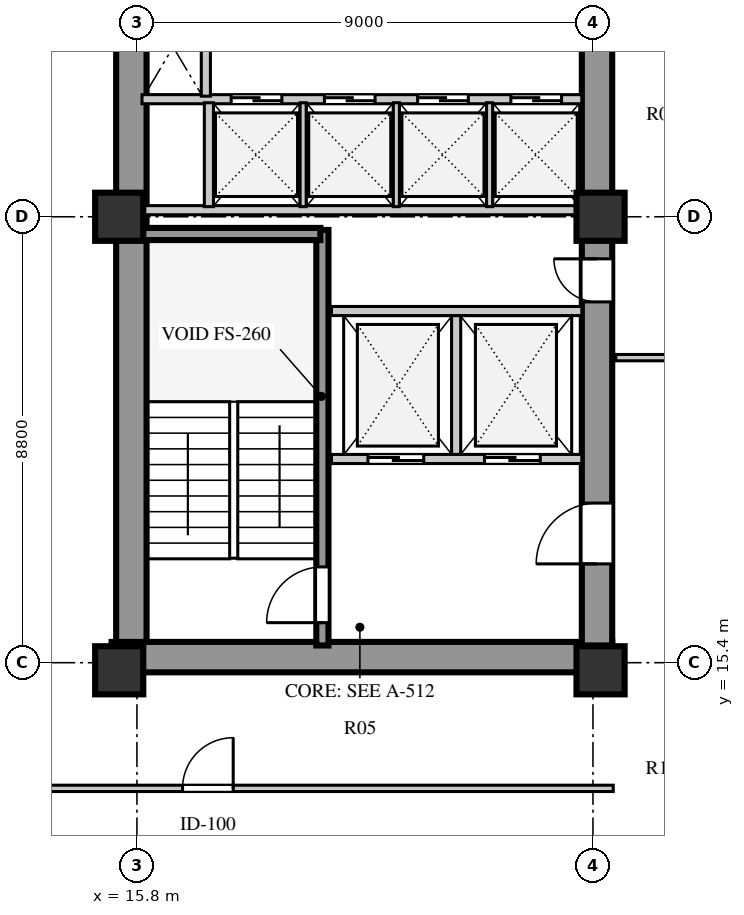
"""IFC4 building model, lengths in metres.
Left out: names, types, materials, properties, quantities, classifications, styles, units other than length and angle.
Written with IfcOpenShell. Run it as: python <this file> out.ifc"""

import sys

from ifc_helpers import new_model, si_unit, direction, frame, frame_2d, origin, origin_2d, place, context, subcontext, project, spatial, rectangle, extrude, element, fill, save


model = new_model("IFC4")
c1 = context("Model", 3, precision=1e-05, world=origin(), true_north=direction((0.0, 1.0)))
c2 = subcontext(c1, "Body", "Model", "MODEL_VIEW")
j1 = project(units=[si_unit("LENGTHUNIT", "METRE"), si_unit("PLANEANGLEUNIT", "RADIAN")], contexts=[c1])
p1 = place(None, origin())
s1 = spatial("IfcSite", under=j1, at=p1, CompositionType="ELEMENT")
p2 = place(p1, origin())
s2 = spatial("IfcBuilding", under=s1, at=p2, CompositionType="ELEMENT")
p3 = place(p2, frame((0.0, 0.0, 90.0)))
s3 = spatial("IfcBuildingStorey", under=s2, at=p3, CompositionType="ELEMENT", Elevation=90.0)
p4 = place(p3, frame((15.3, 15.51, 0.0), z_axis=(0.0, 0.0, 1.0), x_axis=(1.0, 0.0, 0.0)))
e1 = element("IfcWall", 1, at=p4, inside=s3, PredefinedType="SHEAR", context=c2, shape_type="SweptSolid", body=[
    extrude(rectangle(XDim=9.88, YDim=0.6, at=frame_2d((4.94, 0.0))), origin(), (0.0, 0.0, 1.0), 3.7),
])
p5 = place(p3, frame((15.69, 15.81, 0.0), z_axis=(0.0, 0.0, 1.0), x_axis=(0.0, 1.0, 0.0)))
e2 = element("IfcWall", 2, at=p5, inside=s3, PredefinedType="SHEAR", context=c2, shape_type="SweptSolid", body=[
    extrude(rectangle(XDim=25.63, YDim=0.6, at=frame_2d((12.815, 0.0))), origin(), (0.0, 0.0, 1.0), 3.7),
])
p6 = place(p3, frame((24.88, 15.74, 0.0), z_axis=(0.0, 0.0, 1.0), x_axis=(0.0, 1.0, 0.0)))
e3 = element("IfcWall", 3, at=p6, inside=s3, PredefinedType="SHEAR", context=c2, shape_type="SweptSolid", body=[
    extrude(rectangle(XDim=25.76, YDim=0.6, at=frame_2d((12.88, 0.0))), origin(), (0.0, 0.0, 1.0), 3.7),
])
p7 = place(p6, frame((1.61, 0.0, 0.0)))
e4 = element("IfcOpeningElement", 4, at=p7, cuts=e3, PredefinedType="OPENING", context=c2, shape_type="SweptSolid", body=[
    extrude(rectangle(XDim=1.2, YDim=2.1, at=frame_2d((0.6, 1.05))), frame((0.0, 0.31, 0.0), z_axis=(0.0, -1.0, 0.0), x_axis=(1.0, 0.0, 0.0)), (0.0, 0.0, 1.0), 0.62),
])
p8 = place(p6, frame((6.78, 0.0, 0.0)))
e5 = element("IfcOpeningElement", 5, at=p8, cuts=e3, PredefinedType="OPENING", context=c2, shape_type="SweptSolid", body=[
    extrude(rectangle(XDim=0.85, YDim=2.06, at=frame_2d((0.425, 1.03))), frame((0.0, 0.31, 0.0), z_axis=(0.0, -1.0, 0.0), x_axis=(1.0, 0.0, 0.0)), (0.0, 0.0, 1.0), 0.62),
])
p9 = place(p6, frame((12.11, 0.0, 0.0)))
e6 = element("IfcOpeningElement", 6, at=p9, cuts=e3, PredefinedType="OPENING", context=c2, shape_type="SweptSolid", body=[
    extrude(rectangle(XDim=1.5, YDim=2.12, at=frame_2d((0.75, 1.06))), frame((0.0, 0.31, 0.0), z_axis=(0.0, -1.0, 0.0), x_axis=(1.0, 0.0, 0.0)), (0.0, 0.0, 1.0), 0.62),
])
p10 = place(p6, frame((20.11, 0.0, 0.0)))
e7 = element("IfcOpeningElement", 7, at=p10, cuts=e3, PredefinedType="OPENING", context=c2, shape_type="SweptSolid", body=[
    extrude(rectangle(XDim=1.2, YDim=2.12, at=frame_2d((0.6, 1.06))), frame((0.0, 0.31, 0.0), z_axis=(0.0, -1.0, 0.0), x_axis=(1.0, 0.0, 0.0)), (0.0, 0.0, 1.0), 0.62),
])
p11 = place(p6, frame((24.01, 0.0, 0.0)))
e8 = element("IfcOpeningElement", 8, at=p11, cuts=e3, PredefinedType="OPENING", context=c2, shape_type="SweptSolid", body=[
    extrude(rectangle(XDim=0.95, YDim=2.1, at=frame_2d((0.475, 1.05))), frame((0.0, 0.31, 0.0), z_axis=(0.0, -1.0, 0.0), x_axis=(1.0, 0.0, 0.0)), (0.0, 0.0, 1.0), 0.62),
])
for number, where, z_axis, x_axis in (
    (9, (15.45, 15.25, 0.0), (0.0, 0.0, 1.0), (1.0, 0.0, 0.0)),
    (10, (15.45, 24.2, 0.0), (0.0, 0.0, 1.0), (1.0, 0.0, 0.0)),
    (11, (24.95, 15.25, 0.0), (0.0, 0.0, 1.0), (1.0, 0.0, 0.0)),
    (12, (24.95, 24.2, 0.0), (0.0, 0.0, 1.0), (1.0, 0.0, 0.0)),
):
    element("IfcColumn", number, at=place(p3, frame(where, z_axis=z_axis, x_axis=x_axis)), inside=s3, PredefinedType="COLUMN", context=c2, shape_type="SweptSolid", body=[
        extrude(rectangle(XDim=0.95, YDim=0.95, at=origin_2d()), origin(), (0.0, 0.0, 1.0), 3.7),
    ])
p12 = place(p3, frame((19.46, 15.74, 0.0), z_axis=(0.0, 0.0, 1.0), x_axis=(0.0, 1.0, 0.0)))
e13 = element("IfcWall", 13, at=p12, inside=s3, PredefinedType="SHEAR", context=c2, shape_type="SweptSolid", body=[
    extrude(rectangle(XDim=8.2, YDim=0.24, at=frame_2d((4.1, 0.0))), origin(), (0.0, 0.0, 1.0), 4.0),
])
p13 = place(p12, frame((0.45, 0.0, 0.0)))
e14 = element("IfcOpeningElement", 14, at=p13, cuts=e13, PredefinedType="OPENING", context=c2, shape_type="SweptSolid", body=[
    extrude(rectangle(XDim=1.1, YDim=2.1, at=frame_2d((0.55, 1.05))), frame((0.0, 0.13, 0.0), z_axis=(0.0, -1.0, 0.0), x_axis=(1.0, 0.0, 0.0)), (0.0, 0.0, 1.0), 0.26),
])
p14 = place(p3, frame((15.9, 23.86, 0.0), z_axis=(0.0, 0.0, 1.0), x_axis=(1.0, 0.0, 0.0)))
e15 = element("IfcWall", 15, at=p14, inside=s3, PredefinedType="SHEAR", context=c2, shape_type="SweptSolid", body=[
    extrude(rectangle(XDim=3.52, YDim=0.24, at=frame_2d((1.76, 0.0))), origin(), (0.0, 0.0, 1.0), 4.0),
])
p15 = place(p3, frame((19.64, 19.42, 0.0), z_axis=(0.0, 0.0, 1.0), x_axis=(1.0, 0.0, 0.0)))
e16 = element("IfcWall", 16, at=p15, inside=s3, PredefinedType="SOLIDWALL", context=c2, shape_type="SweptSolid", body=[
    extrude(rectangle(XDim=4.94, YDim=0.18, at=frame_2d((2.47, 0.0))), origin(), (0.0, 0.0, 1.0), 3.7),
])
p16 = place(p15, frame((0.72, 0.0, 0.0)))
e17 = element("IfcOpeningElement", 17, at=p16, cuts=e16, PredefinedType="OPENING", context=c2, shape_type="SweptSolid", body=[
    extrude(rectangle(XDim=1.1, YDim=2.1, at=frame_2d((0.55, 1.05))), frame((0.0, 0.1, 0.0), z_axis=(0.0, -1.0, 0.0), x_axis=(1.0, 0.0, 0.0)), (0.0, 0.0, 1.0), 0.2),
])
p17 = place(p15, frame((3.02, 0.0, 0.0)))
e18 = element("IfcOpeningElement", 18, at=p17, cuts=e16, PredefinedType="OPENING", context=c2, shape_type="SweptSolid", body=[
    extrude(rectangle(XDim=1.1, YDim=2.1, at=frame_2d((0.55, 1.05))), frame((0.0, 0.1, 0.0), z_axis=(0.0, -1.0, 0.0), x_axis=(1.0, 0.0, 0.0)), (0.0, 0.0, 1.0), 0.2),
])
p18 = place(p3, frame((22.1, 19.51, 0.0), z_axis=(0.0, 0.0, 1.0), x_axis=(0.0, 1.0, 0.0)))
e19 = element("IfcWall", 19, at=p18, inside=s3, PredefinedType="SOLIDWALL", context=c2, shape_type="SweptSolid", body=[
    extrude(rectangle(XDim=2.74, YDim=0.18, at=frame_2d((1.37, 0.0))), origin(), (0.0, 0.0, 1.0), 3.7),
])
p19 = place(p3, frame((19.64, 22.34, 0.0), z_axis=(0.0, 0.0, 1.0), x_axis=(1.0, 0.0, 0.0)))
e20 = element("IfcWall", 20, at=p19, inside=s3, PredefinedType="SOLIDWALL", context=c2, shape_type="SweptSolid", body=[
    extrude(rectangle(XDim=4.94, YDim=0.18, at=frame_2d((2.47, 0.0))), origin(), (0.0, 0.0, 1.0), 3.7),
])
p20 = place(p3, frame((15.9, 26.52, 0.0), z_axis=(0.0, 0.0, 1.0), x_axis=(1.0, 0.0, 0.0)))
e21 = element("IfcWall", 21, at=p20, inside=s3, PredefinedType="SOLIDWALL", context=c2, shape_type="SweptSolid", body=[
    extrude(rectangle(XDim=8.68, YDim=0.18, at=frame_2d((4.34, 0.0))), origin(), (0.0, 0.0, 1.0), 3.7),
])
p21 = place(p20, frame((1.76, 0.0, 0.0)))
e22 = element("IfcOpeningElement", 22, at=p21, cuts=e21, PredefinedType="OPENING", context=c2, shape_type="SweptSolid", body=[
    extrude(rectangle(XDim=1.0, YDim=2.1, at=frame_2d((0.5, 1.05))), frame((0.0, 0.1, 0.0), z_axis=(0.0, -1.0, 0.0), x_axis=(1.0, 0.0, 0.0)), (0.0, 0.0, 1.0), 0.2),
])
p22 = place(p20, frame((3.6, 0.0, 0.0)))
e23 = element("IfcOpeningElement", 23, at=p22, cuts=e21, PredefinedType="OPENING", context=c2, shape_type="SweptSolid", body=[
    extrude(rectangle(XDim=1.0, YDim=2.1, at=frame_2d((0.5, 1.05))), frame((0.0, 0.1, 0.0), z_axis=(0.0, -1.0, 0.0), x_axis=(1.0, 0.0, 0.0)), (0.0, 0.0, 1.0), 0.2),
])
p23 = place(p20, frame((5.44, 0.0, 0.0)))
e24 = element("IfcOpeningElement", 24, at=p23, cuts=e21, PredefinedType="OPENING", context=c2, shape_type="SweptSolid", body=[
    extrude(rectangle(XDim=1.0, YDim=2.1, at=frame_2d((0.5, 1.05))), frame((0.0, 0.1, 0.0), z_axis=(0.0, -1.0, 0.0), x_axis=(1.0, 0.0, 0.0)), (0.0, 0.0, 1.0), 0.2),
])
p24 = place(p20, frame((7.28, 0.0, 0.0)))
e25 = element("IfcOpeningElement", 25, at=p24, cuts=e21, PredefinedType="OPENING", context=c2, shape_type="SweptSolid", body=[
    extrude(rectangle(XDim=1.0, YDim=2.1, at=frame_2d((0.5, 1.05))), frame((0.0, 0.1, 0.0), z_axis=(0.0, -1.0, 0.0), x_axis=(1.0, 0.0, 0.0)), (0.0, 0.0, 1.0), 0.2),
])
p25 = place(p3, frame((15.9, 24.33, 0.0), z_axis=(0.0, 0.0, 1.0), x_axis=(1.0, 0.0, 0.0)))
e26 = element("IfcWall", 26, at=p25, inside=s3, PredefinedType="SOLIDWALL", context=c2, shape_type="SweptSolid", body=[
    extrude(rectangle(XDim=8.68, YDim=0.18, at=frame_2d((4.34, 0.0))), origin(), (0.0, 0.0, 1.0), 3.0),
])
p26 = place(p3, frame((17.22, 24.4, 0.0), z_axis=(0.0, 0.0, 1.0), x_axis=(0.0, 1.0, 0.0)))
e27 = element("IfcWall", 27, at=p26, inside=s3, PredefinedType="SOLIDWALL", context=c2, shape_type="SweptSolid", body=[
    extrude(rectangle(XDim=2.05, YDim=0.18, at=frame_2d((1.025, 0.0))), origin(), (0.0, 0.0, 1.0), 3.7),
])
for number, where, z_axis, x_axis in (
    (28, (19.08, 24.4, 0.0), (0.0, 0.0, 1.0), (0.0, 1.0, 0.0)),
    (29, (20.92, 24.4, 0.0), (0.0, 0.0, 1.0), (0.0, 1.0, 0.0)),
    (30, (22.76, 24.4, 0.0), (0.0, 0.0, 1.0), (0.0, 1.0, 0.0)),
):
    element("IfcWall", number, at=place(p3, frame(where, z_axis=z_axis, x_axis=x_axis)), inside=s3, PredefinedType="PARTITIONING", context=c2, shape_type="SweptSolid", body=[
        extrude(rectangle(XDim=2.05, YDim=0.12, at=frame_2d((1.025, 0.0))), origin(), (0.0, 0.0, 1.0), 3.7),
    ])
p27 = place(p3, frame((17.16, 26.58, 0.0), z_axis=(0.0, 0.0, 1.0), x_axis=(0.0, 1.0, 0.0)))
e31 = element("IfcWall", 31, at=p27, inside=s3, PredefinedType="SOLIDWALL", context=c2, shape_type="SweptSolid", body=[
    extrude(rectangle(XDim=4.02, YDim=0.18, at=frame_2d((2.01, 0.0))), origin(), (0.0, 0.0, 1.0), 3.7),
])
p28 = place(p27, frame((2.35, 0.0, 0.0)))
e32 = element("IfcOpeningElement", 32, at=p28, cuts=e31, PredefinedType="OPENING", context=c2, shape_type="SweptSolid", body=[
    extrude(rectangle(XDim=0.85, YDim=2.06, at=frame_2d((0.425, 1.03))), frame((0.0, 0.1, 0.0), z_axis=(0.0, -1.0, 0.0), x_axis=(1.0, 0.0, 0.0)), (0.0, 0.0, 1.0), 0.2),
])
p29 = place(p3, frame((25.25, 21.42, 0.0), z_axis=(0.0, 0.0, 1.0), x_axis=(1.0, 0.0, 0.0)))
e33 = element("IfcWall", 33, at=p29, inside=s3, PredefinedType="PLUMBINGWALL", context=c2, shape_type="SweptSolid", body=[
    extrude(rectangle(XDim=12.87, YDim=0.125, at=frame_2d((6.435, 0.0))), origin(), (0.0, 0.0, 1.0), 3.3),
])
p30 = place(p29, frame((1.725, 0.0, 0.0)))
e34 = element("IfcOpeningElement", 34, at=p30, cuts=e33, PredefinedType="OPENING", context=c2, shape_type="SweptSolid", body=[
    extrude(rectangle(XDim=0.95, YDim=2.08, at=frame_2d((0.475, 1.04))), frame((0.0, 0.073, 0.0), z_axis=(0.0, -1.0, 0.0), x_axis=(1.0, 0.0, 0.0)), (0.0, 0.0, 1.0), 0.145),
])
p31 = place(p29, frame((6.175, 0.0, 0.0)))
e35 = element("IfcOpeningElement", 35, at=p31, cuts=e33, PredefinedType="OPENING", context=c2, shape_type="SweptSolid", body=[
    extrude(rectangle(XDim=0.95, YDim=2.08, at=frame_2d((0.475, 1.04))), frame((0.0, 0.073, 0.0), z_axis=(0.0, -1.0, 0.0), x_axis=(1.0, 0.0, 0.0)), (0.0, 0.0, 1.0), 0.145),
])
p32 = place(p29, frame((10.395, 0.0, 0.0)))
e36 = element("IfcOpeningElement", 36, at=p32, cuts=e33, PredefinedType="OPENING", context=c2, shape_type="SweptSolid", body=[
    extrude(rectangle(XDim=0.95, YDim=2.08, at=frame_2d((0.475, 1.04))), frame((0.0, 0.073, 0.0), z_axis=(0.0, -1.0, 0.0), x_axis=(1.0, 0.0, 0.0)), (0.0, 0.0, 1.0), 0.145),
])
p33 = place(p3, frame((10.5, 12.92, 0.0), z_axis=(0.0, 0.0, 1.0), x_axis=(1.0, 0.0, 0.0)))
e37 = element("IfcWall", 37, at=p33, inside=s3, PredefinedType="PLUMBINGWALL", context=c2, shape_type="SweptSolid", body=[
    extrude(rectangle(XDim=14.7, YDim=0.125, at=frame_2d((7.35, 0.0))), origin(), (0.0, 0.0, 1.0), 3.7),
])
p34 = place(p33, frame((6.2, 0.0, 0.0)))
e38 = element("IfcOpeningElement", 38, at=p34, cuts=e37, PredefinedType="OPENING", context=c2, shape_type="SweptSolid", body=[
    extrude(rectangle(XDim=1.0, YDim=2.08, at=frame_2d((0.5, 1.04))), frame((0.0, 0.073, 0.0), z_axis=(0.0, -1.0, 0.0), x_axis=(1.0, 0.0, 0.0)), (0.0, 0.0, 1.0), 0.145),
])
p35 = place(p13, origin())
e39 = element("IfcDoor", 39, at=p35, inside=s3, OperationType="SINGLE_SWING_LEFT", PredefinedType="DOOR", context=c2, shape_type="SweptSolid", body=[
    extrude(rectangle(XDim=1.1, YDim=2.1, at=frame_2d((0.55, 1.05))), frame((0.0, 0.025, 0.0), z_axis=(0.0, -1.0, 0.0), x_axis=(1.0, 0.0, 0.0)), (0.0, 0.0, 1.0), 0.05),
])
fill(e14, e39)
p36 = place(p16, origin())
e40 = element("IfcDoor", 40, at=p36, inside=s3, OperationType="DOUBLE_DOOR_SLIDING", PredefinedType="DOOR", context=c2, shape_type="SweptSolid", body=[
    extrude(rectangle(XDim=1.1, YDim=2.1, at=frame_2d((0.55, 1.05))), frame((0.0, 0.025, 0.0), z_axis=(0.0, -1.0, 0.0), x_axis=(1.0, 0.0, 0.0)), (0.0, 0.0, 1.0), 0.05),
])
fill(e17, e40)
p37 = place(p17, origin())
e41 = element("IfcDoor", 41, at=p37, inside=s3, OperationType="DOUBLE_DOOR_SLIDING", PredefinedType="DOOR", context=c2, shape_type="SweptSolid", body=[
    extrude(rectangle(XDim=1.1, YDim=2.1, at=frame_2d((0.55, 1.05))), frame((0.0, 0.025, 0.0), z_axis=(0.0, -1.0, 0.0), x_axis=(1.0, 0.0, 0.0)), (0.0, 0.0, 1.0), 0.05),
])
fill(e18, e41)
p38 = place(p7, frame((1.2, 0.0, 0.0), z_axis=(0.0, 0.0, 1.0), x_axis=(-1.0, 0.0, 0.0)))
e42 = element("IfcDoor", 42, at=p38, inside=s3, OperationType="SINGLE_SWING_RIGHT", PredefinedType="DOOR", context=c2, shape_type="SweptSolid", body=[
    extrude(rectangle(XDim=1.2, YDim=2.1, at=frame_2d((0.6, 1.05))), frame((0.0, 0.025, 0.0), z_axis=(0.0, -1.0, 0.0), x_axis=(1.0, 0.0, 0.0)), (0.0, 0.0, 1.0), 0.05),
])
fill(e4, e42)
p39 = place(p8, frame((0.85, 0.0, 0.0), z_axis=(0.0, 0.0, 1.0), x_axis=(-1.0, 0.0, 0.0)))
e43 = element("IfcDoor", 43, at=p39, inside=s3, OperationType="SINGLE_SWING_LEFT", PredefinedType="DOOR", context=c2, shape_type="SweptSolid", body=[
    extrude(rectangle(XDim=0.85, YDim=2.06, at=frame_2d((0.425, 1.03))), frame((0.0, 0.025, 0.0), z_axis=(0.0, -1.0, 0.0), x_axis=(1.0, 0.0, 0.0)), (0.0, 0.0, 1.0), 0.05),
])
fill(e5, e43)
p40 = place(p21, origin())
e44 = element("IfcDoor", 44, at=p40, inside=s3, OperationType="DOUBLE_DOOR_SLIDING", PredefinedType="DOOR", context=c2, shape_type="SweptSolid", body=[
    extrude(rectangle(XDim=1.0, YDim=2.1, at=frame_2d((0.5, 1.05))), frame((0.0, 0.025, 0.0), z_axis=(0.0, -1.0, 0.0), x_axis=(1.0, 0.0, 0.0)), (0.0, 0.0, 1.0), 0.05),
])
fill(e22, e44)
p41 = place(p22, origin())
e45 = element("IfcDoor", 45, at=p41, inside=s3, OperationType="DOUBLE_DOOR_SLIDING", PredefinedType="DOOR", context=c2, shape_type="SweptSolid", body=[
    extrude(rectangle(XDim=1.0, YDim=2.1, at=frame_2d((0.5, 1.05))), frame((0.0, 0.025, 0.0), z_axis=(0.0, -1.0, 0.0), x_axis=(1.0, 0.0, 0.0)), (0.0, 0.0, 1.0), 0.05),
])
fill(e23, e45)
p42 = place(p23, origin())
e46 = element("IfcDoor", 46, at=p42, inside=s3, OperationType="DOUBLE_DOOR_SLIDING", PredefinedType="DOOR", context=c2, shape_type="SweptSolid", body=[
    extrude(rectangle(XDim=1.0, YDim=2.1, at=frame_2d((0.5, 1.05))), frame((0.0, 0.025, 0.0), z_axis=(0.0, -1.0, 0.0), x_axis=(1.0, 0.0, 0.0)), (0.0, 0.0, 1.0), 0.05),
])
fill(e24, e46)
p43 = place(p24, origin())
e47 = element("IfcDoor", 47, at=p43, inside=s3, OperationType="DOUBLE_DOOR_SLIDING", PredefinedType="DOOR", context=c2, shape_type="SweptSolid", body=[
    extrude(rectangle(XDim=1.0, YDim=2.1, at=frame_2d((0.5, 1.05))), frame((0.0, 0.025, 0.0), z_axis=(0.0, -1.0, 0.0), x_axis=(1.0, 0.0, 0.0)), (0.0, 0.0, 1.0), 0.05),
])
fill(e25, e47)
p44 = place(p34, frame((1.0, 0.0, 0.0), z_axis=(0.0, 0.0, 1.0), x_axis=(-1.0, 0.0, 0.0)))
e48 = element("IfcDoor", 48, at=p44, inside=s3, OperationType="SINGLE_SWING_LEFT", PredefinedType="DOOR", context=c2, shape_type="SweptSolid", body=[
    extrude(rectangle(XDim=1.0, YDim=2.08, at=frame_2d((0.5, 1.04))), frame((0.0, 0.025, 0.0), z_axis=(0.0, -1.0, 0.0), x_axis=(1.0, 0.0, 0.0)), (0.0, 0.0, 1.0), 0.05),
])
fill(e38, e48)
save(model, sys.argv[1])
